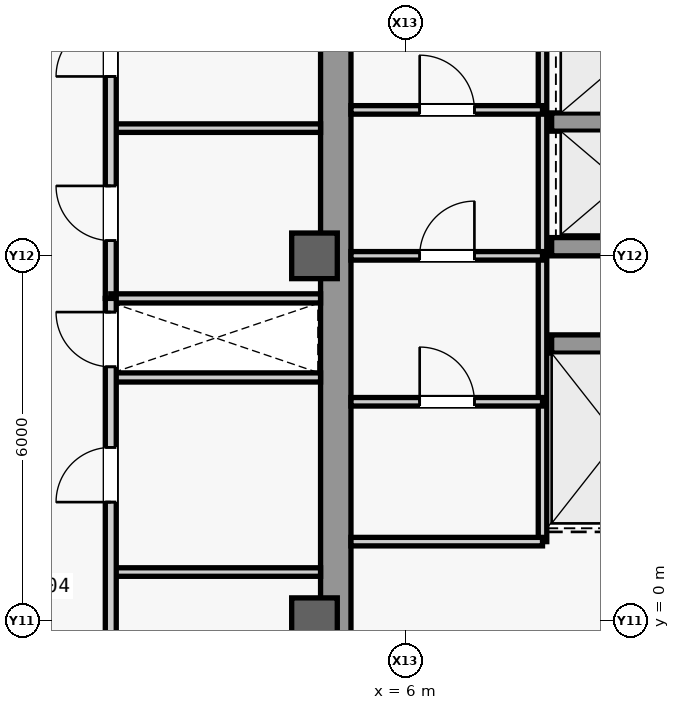
"""IFC4 building model, lengths in metres.
Left out: names, types, materials, properties, quantities, classifications, styles, units other than length and angle.
Written with IfcOpenShell. Run it as: python <this file> out.ifc"""

import sys

from ifc_helpers import new_model, si_unit, direction, frame, frame_2d, origin, origin_2d, place, context, subcontext, project, spatial, rectangle, extrude, source, transform, mapped, element, fill, save


model = new_model("IFC4")
c1 = context("Model", 3, precision=1e-05, world=origin(), true_north=direction((0.0, 1.0)))
c2 = subcontext(c1, "Body", "Model", "MODEL_VIEW")
j1 = project(units=[si_unit("LENGTHUNIT", "METRE"), si_unit("PLANEANGLEUNIT", "RADIAN")], contexts=[c1])
p1 = place(None, origin())
s1 = spatial("IfcSite", under=j1, at=p1, CompositionType="ELEMENT")
p2 = place(p1, origin())
s2 = spatial("IfcBuilding", under=s1, at=p2, CompositionType="ELEMENT")
p3 = place(p2, frame((0.0, 0.0, 321.5)))
s3 = spatial("IfcBuildingStorey", under=s2, at=p3, CompositionType="ELEMENT", Elevation=321.5)
m1 = source(origin(), c2, "Body", "SweptSolid", [
    extrude(rectangle(XDim=21.4, YDim=0.5, at=frame_2d((10.7, 0.0))), origin(), (0.0, 0.0, 1.0), 4.54),
])
p4 = place(p3, frame((4.85, -10.7, 0.0), z_axis=(0.0, 0.0, 1.0), x_axis=(0.0, 1.0, 0.0)))
e1 = element("IfcWall", 1, at=p4, inside=s3, PredefinedType="SHEAR", context=c2, shape_type="MappedRepresentation", body=[
    mapped(m1, transform((0.0, 0.0, 0.0), scale=1.0)),
])
m2 = source(origin(), c2, "Body", "SweptSolid", [
    extrude(rectangle(XDim=0.75, YDim=0.75, at=origin_2d()), origin(), (0.0, 0.0, 1.0), 4.8),
])
for number, where, z_axis, x_axis in (
    (2, (4.5, 0.0, 0.0), (0.0, 0.0, 1.0), (1.0, 0.0, 0.0)),
    (3, (4.5, 6.0, 0.0), (0.0, 0.0, 1.0), (1.0, 0.0, 0.0)),
):
    element("IfcColumn", number, at=place(p3, frame(where, z_axis=z_axis, x_axis=x_axis)), inside=s3, PredefinedType="COLUMN", context=c2, shape_type="MappedRepresentation", body=[
        mapped(m2, transform((0.0, 0.0, 0.0), scale=1.0)),
    ])
m3 = source(origin(), c2, "Body", "SweptSolid", [
    extrude(rectangle(XDim=2.3, YDim=0.3, at=frame_2d((1.15, 0.0))), origin(), (0.0, 0.0, 1.0), 4.54),
])
for number, where, z_axis, x_axis in (
    (4, (8.4, 4.55, 0.0), (0.0, 0.0, 1.0), (1.0, 0.0, 0.0)),
    (5, (8.4, 6.15, 0.0), (0.0, 0.0, 1.0), (1.0, 0.0, 0.0)),
    (6, (8.4, 8.2, 0.0), (0.0, 0.0, 1.0), (1.0, 0.0, 0.0)),
):
    element("IfcWall", number, at=place(p3, frame(where, z_axis=z_axis, x_axis=x_axis)), inside=s3, PredefinedType="SHEAR", context=c2, shape_type="MappedRepresentation", body=[
        mapped(m3, transform((0.0, 0.0, 0.0), scale=1.0)),
    ])
m4 = source(origin(), c2, "Body", "SweptSolid", [
    extrude(rectangle(XDim=9.4, YDim=0.14, at=frame_2d((4.7, 0.0))), origin(), (0.0, 0.0, 1.0), 4.54),
])
p5 = place(p3, frame((8.25, 1.3, 0.0), z_axis=(0.0, 0.0, 1.0), x_axis=(0.0, 1.0, 0.0)))
e7 = element("IfcWall", 7, at=p5, inside=s3, PredefinedType="PARTITIONING", context=c2, shape_type="MappedRepresentation", body=[
    mapped(m4, transform((0.0, 0.0, 0.0), scale=1.0)),
])
m5 = source(origin(), c2, "Body", "SweptSolid", [
    extrude(rectangle(XDim=3.15, YDim=0.14, at=frame_2d((1.575, 0.0))), origin(), (0.0, 0.0, 1.0), 4.54),
])
p6 = place(p3, frame((5.1, 1.3, 0.0), z_axis=(0.0, 0.0, 1.0), x_axis=(1.0, 0.0, 0.0)))
e8 = element("IfcWall", 8, at=p6, inside=s3, PredefinedType="PARTITIONING", context=c2, shape_type="MappedRepresentation", body=[
    mapped(m5, transform((0.0, 0.0, 0.0), scale=1.0)),
])
p7 = place(p3, frame((5.1, 8.4, 0.0), z_axis=(0.0, 0.0, 1.0), x_axis=(1.0, 0.0, 0.0)))
e9 = element("IfcWall", 9, at=p7, inside=s3, PredefinedType="PARTITIONING", context=c2, shape_type="MappedRepresentation", body=[
    mapped(m5, transform((0.0, 0.0, 0.0), scale=1.0)),
])
m6 = source(origin(), c2, "Body", "SweptSolid", [
    extrude(rectangle(XDim=0.9, YDim=2.15, at=frame_2d((0.45, 1.075))), frame((0.0, 0.08, 0.0), z_axis=(0.0, -1.0, 0.0), x_axis=(1.0, 0.0, 0.0)), (0.0, 0.0, 1.0), 0.16),
])
p8 = place(p7, frame((1.13, 0.0, 0.0)))
e10 = element("IfcOpeningElement", 10, at=p8, cuts=e9, PredefinedType="OPENING", context=c2, shape_type="MappedRepresentation", body=[
    mapped(m6, transform((0.0, 0.0, 0.0), scale=1.0)),
])
p9 = place(p3, frame((5.1, 6.0, 0.0), z_axis=(0.0, 0.0, 1.0), x_axis=(1.0, 0.0, 0.0)))
e11 = element("IfcWall", 11, at=p9, inside=s3, PredefinedType="PARTITIONING", context=c2, shape_type="MappedRepresentation", body=[
    mapped(m5, transform((0.0, 0.0, 0.0), scale=1.0)),
])
p10 = place(p9, frame((1.13, 0.0, 0.0)))
e12 = element("IfcOpeningElement", 12, at=p10, cuts=e11, PredefinedType="OPENING", context=c2, shape_type="MappedRepresentation", body=[
    mapped(m6, transform((0.0, 0.0, 0.0), scale=1.0)),
])
p11 = place(p3, frame((5.1, 3.6, 0.0), z_axis=(0.0, 0.0, 1.0), x_axis=(1.0, 0.0, 0.0)))
e13 = element("IfcWall", 13, at=p11, inside=s3, PredefinedType="PARTITIONING", context=c2, shape_type="MappedRepresentation", body=[
    mapped(m5, transform((0.0, 0.0, 0.0), scale=1.0)),
])
p12 = place(p11, frame((1.13, 0.0, 0.0)))
e14 = element("IfcOpeningElement", 14, at=p12, cuts=e13, PredefinedType="OPENING", context=c2, shape_type="MappedRepresentation", body=[
    mapped(m6, transform((0.0, 0.0, 0.0), scale=1.0)),
])
m7 = source(origin(), c2, "Body", "SweptSolid", [
    extrude(rectangle(XDim=3.45, YDim=0.15, at=frame_2d((1.725, 0.0))), origin(), (0.0, 0.0, 1.0), 4.54),
])
p13 = place(p3, frame((1.15, 4.0, 0.0), z_axis=(0.0, 0.0, 1.0), x_axis=(1.0, 0.0, 0.0)))
e15 = element("IfcWall", 15, at=p13, inside=s3, PredefinedType="PARTITIONING", context=c2, shape_type="MappedRepresentation", body=[
    mapped(m7, transform((0.0, 0.0, 0.0), scale=1.0)),
])
m8 = source(origin(), c2, "Body", "SweptSolid", [
    extrude(rectangle(XDim=3.45, YDim=0.14, at=frame_2d((1.725, 0.0))), origin(), (0.0, 0.0, 1.0), 4.54),
])
p14 = place(p3, frame((1.15, 8.1, 0.0), z_axis=(0.0, 0.0, 1.0), x_axis=(1.0, 0.0, 0.0)))
e16 = element("IfcWall", 16, at=p14, inside=s3, PredefinedType="PARTITIONING", context=c2, shape_type="MappedRepresentation", body=[
    mapped(m8, transform((0.0, 0.0, 0.0), scale=1.0)),
])
m9 = source(origin(), c2, "Body", "SweptSolid", [
    extrude(rectangle(XDim=5.4, YDim=0.18, at=frame_2d((2.7, 0.0))), origin(), (0.0, 0.0, 1.0), 4.54),
])
p15 = place(p3, frame((1.15, 5.3, 0.0), z_axis=(0.0, 0.0, 1.0), x_axis=(0.0, 1.0, 0.0)))
e17 = element("IfcWall", 17, at=p15, inside=s3, PredefinedType="PARTITIONING", context=c2, shape_type="MappedRepresentation", body=[
    mapped(m9, transform((0.0, 0.0, 0.0), scale=1.0)),
])
m10 = source(origin(), c2, "Body", "SweptSolid", [
    extrude(rectangle(XDim=0.9, YDim=2.15, at=frame_2d((0.45, 1.075))), frame((0.0, 0.1, 0.0), z_axis=(0.0, -1.0, 0.0), x_axis=(1.0, 0.0, 0.0)), (0.0, 0.0, 1.0), 0.2),
])
p16 = place(p15, frame((0.95, 0.0, 0.0)))
e18 = element("IfcOpeningElement", 18, at=p16, cuts=e17, PredefinedType="OPENING", context=c2, shape_type="MappedRepresentation", body=[
    mapped(m10, transform((0.0, 0.0, 0.0), scale=1.0)),
])
p17 = place(p15, frame((3.65, 0.0, 0.0)))
e19 = element("IfcOpeningElement", 19, at=p17, cuts=e17, PredefinedType="OPENING", context=c2, shape_type="MappedRepresentation", body=[
    mapped(m10, transform((0.0, 0.0, 0.0), scale=1.0)),
])
p18 = place(p3, frame((1.15, 5.3, 0.0), z_axis=(0.0, 0.0, 1.0), x_axis=(1.0, 0.0, 0.0)))
e20 = element("IfcWall", 20, at=p18, inside=s3, PredefinedType="PARTITIONING", context=c2, shape_type="MappedRepresentation", body=[
    mapped(m7, transform((0.0, 0.0, 0.0), scale=1.0)),
])
p19 = place(p3, frame((1.15, 0.8, 0.0), z_axis=(0.0, 0.0, 1.0), x_axis=(1.0, 0.0, 0.0)))
e21 = element("IfcWall", 21, at=p19, inside=s3, PredefinedType="PARTITIONING", context=c2, shape_type="MappedRepresentation", body=[
    mapped(m8, transform((0.0, 0.0, 0.0), scale=1.0)),
])
m11 = source(origin(), c2, "Body", "SweptSolid", [
    extrude(rectangle(XDim=10.6, YDim=0.18, at=frame_2d((5.3, 0.0))), origin(), (0.0, 0.0, 1.0), 4.54),
])
p20 = place(p3, frame((1.15, -5.3, 0.0), z_axis=(0.0, 0.0, 1.0), x_axis=(0.0, 1.0, 0.0)))
e22 = element("IfcWall", 22, at=p20, inside=s3, PredefinedType="PARTITIONING", context=c2, shape_type="MappedRepresentation", body=[
    mapped(m11, transform((0.0, 0.0, 0.0), scale=1.0)),
])
p21 = place(p20, frame((2.6, 0.0, 0.0)))
e23 = element("IfcOpeningElement", 23, at=p21, cuts=e22, PredefinedType="OPENING", context=c2, shape_type="MappedRepresentation", body=[
    mapped(m10, transform((0.0, 0.0, 0.0), scale=1.0)),
])
p22 = place(p20, frame((7.25, 0.0, 0.0)))
e24 = element("IfcOpeningElement", 24, at=p22, cuts=e22, PredefinedType="OPENING", context=c2, shape_type="MappedRepresentation", body=[
    mapped(m10, transform((0.0, 0.0, 0.0), scale=1.0)),
])
p23 = place(p20, frame((9.475, 0.0, 0.0)))
e25 = element("IfcOpeningElement", 25, at=p23, cuts=e22, PredefinedType="OPENING", context=c2, shape_type="MappedRepresentation", body=[
    mapped(m10, transform((0.0, 0.0, 0.0), scale=1.0)),
])
m12 = source(origin(), c2, "Body", "SweptSolid", [
    extrude(rectangle(XDim=0.9, YDim=2.15, at=frame_2d((0.45, 1.075))), frame((0.0, 0.025, 0.0), z_axis=(0.0, -1.0, 0.0), x_axis=(1.0, 0.0, 0.0)), (0.0, 0.0, 1.0), 0.05),
])
p24 = place(p8, origin())
e26 = element("IfcDoor", 26, at=p24, inside=s3, OperationType="SINGLE_SWING_LEFT", PredefinedType="DOOR", context=c2, shape_type="MappedRepresentation", body=[
    mapped(m12, transform((0.0, 0.0, 0.0), scale=1.0)),
])
fill(e10, e26)
p25 = place(p10, origin())
e27 = element("IfcDoor", 27, at=p25, inside=s3, OperationType="SINGLE_SWING_RIGHT", PredefinedType="DOOR", context=c2, shape_type="MappedRepresentation", body=[
    mapped(m12, transform((0.0, 0.0, 0.0), scale=1.0)),
])
fill(e12, e27)
p26 = place(p12, origin())
e28 = element("IfcDoor", 28, at=p26, inside=s3, OperationType="SINGLE_SWING_LEFT", PredefinedType="DOOR", context=c2, shape_type="MappedRepresentation", body=[
    mapped(m12, transform((0.0, 0.0, 0.0), scale=1.0)),
])
fill(e14, e28)
p27 = place(p16, origin())
e29 = element("IfcDoor", 29, at=p27, inside=s3, OperationType="SINGLE_SWING_RIGHT", PredefinedType="DOOR", context=c2, shape_type="MappedRepresentation", body=[
    mapped(m12, transform((0.0, 0.0, 0.0), scale=1.0)),
])
fill(e18, e29)
p28 = place(p17, origin())
e30 = element("IfcDoor", 30, at=p28, inside=s3, OperationType="SINGLE_SWING_LEFT", PredefinedType="DOOR", context=c2, shape_type="MappedRepresentation", body=[
    mapped(m12, transform((0.0, 0.0, 0.0), scale=1.0)),
])
fill(e19, e30)
p29 = place(p22, origin())
e31 = element("IfcDoor", 31, at=p29, inside=s3, OperationType="SINGLE_SWING_LEFT", PredefinedType="DOOR", context=c2, shape_type="MappedRepresentation", body=[
    mapped(m12, transform((0.0, 0.0, 0.0), scale=1.0)),
])
fill(e24, e31)
p30 = place(p23, origin())
e32 = element("IfcDoor", 32, at=p30, inside=s3, OperationType="SINGLE_SWING_RIGHT", PredefinedType="DOOR", context=c2, shape_type="MappedRepresentation", body=[
    mapped(m12, transform((0.0, 0.0, 0.0), scale=1.0)),
])
fill(e25, e32)
save(model, sys.argv[1])
